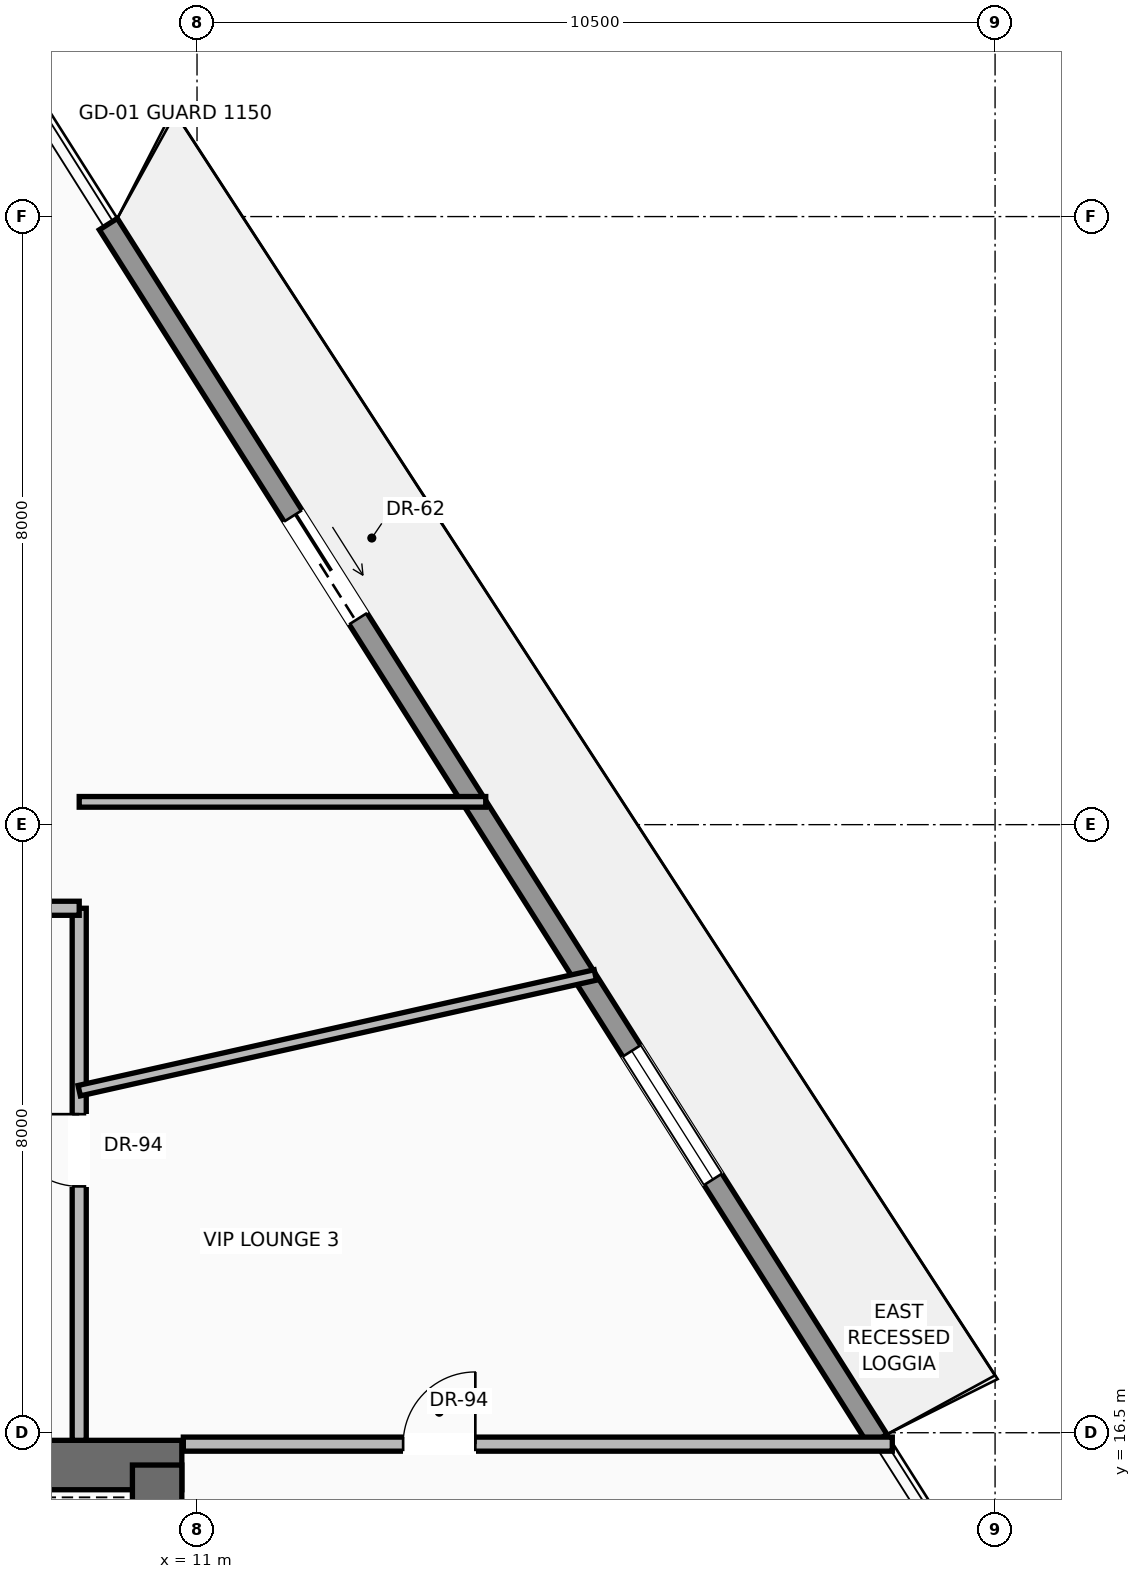
"""IFC4 building model, lengths in metres.
Left out: names, types, materials, properties, quantities, classifications, styles, units other than length and angle.
Written with IfcOpenShell. Run it as: python <this file> out.ifc"""

import sys

from ifc_helpers import new_model, si_unit, direction, frame, frame_2d, origin, place, context, subcontext, project, spatial, rectangle, extrude, source, transform, mapped, element, fill, save


model = new_model("IFC4")
c1 = context("Model", 3, precision=1e-05, world=origin(), true_north=direction((0.0, 1.0)))
c2 = subcontext(c1, "Body", "Model", "MODEL_VIEW")
j1 = project(units=[si_unit("LENGTHUNIT", "METRE"), si_unit("PLANEANGLEUNIT", "RADIAN")], contexts=[c1])
p1 = place(None, origin())
s1 = spatial("IfcSite", under=j1, at=p1, CompositionType="ELEMENT")
p2 = place(p1, origin())
s2 = spatial("IfcBuilding", under=s1, at=p2, CompositionType="ELEMENT")
p3 = place(p2, frame((0.0, 0.0, 189.5)))
s3 = spatial("IfcBuildingStorey", under=s2, at=p3, CompositionType="ELEMENT", Elevation=189.5)
p4 = place(p3, frame((-10.8, 16.075, 0.0), z_axis=(0.0, 0.0, 1.0), x_axis=(1.0, 0.0, 0.0)))
e1 = element("IfcWall", 1, at=p4, inside=s3, PredefinedType="SHEAR", context=c2, shape_type="SweptSolid", body=[
    extrude(rectangle(XDim=21.6, YDim=0.65, at=frame_2d((10.8, 0.0))), origin(), (0.0, 0.0, 1.0), 3.47),
])
p5 = place(p4, frame((3.37, 0.0, 0.0)))
e2 = element("IfcOpeningElement", 2, at=p5, cuts=e1, PredefinedType="OPENING", context=c2, shape_type="SweptSolid", body=[
    extrude(rectangle(XDim=1.3, YDim=2.3, at=frame_2d((0.65, 1.15))), frame((0.0, 0.335, 0.0), z_axis=(0.0, -1.0, 0.0), x_axis=(1.0, 0.0, 0.0)), (0.0, 0.0, 1.0), 0.67),
])
p6 = place(p4, frame((9.8, 0.0, 0.0)))
e3 = element("IfcOpeningElement", 3, at=p6, cuts=e1, PredefinedType="OPENING", context=c2, shape_type="SweptSolid", body=[
    extrude(rectangle(XDim=2.0, YDim=2.4, at=frame_2d((1.0, 1.2))), frame((0.0, 0.335, 0.0), z_axis=(0.0, -1.0, 0.0), x_axis=(1.0, 0.0, 0.0)), (0.0, 0.0, 1.0), 0.67),
])
p7 = place(p3, frame((10.475, 0.525, 0.0), z_axis=(0.0, 0.0, 1.0), x_axis=(0.0, 1.0, 0.0)))
e4 = element("IfcWall", 4, at=p7, inside=s3, PredefinedType="SHEAR", context=c2, shape_type="SweptSolid", body=[
    extrude(rectangle(XDim=15.55, YDim=0.65, at=frame_2d((7.775, 0.0))), origin(), (0.0, 0.0, 1.0), 3.47),
])
p8 = place(p3, frame((9.833, 32.401, 0.0), z_axis=(0.0, 0.0, 1.0), x_axis=(0.534873816305, -0.844931950296, 0.0)))
e5 = element("IfcWall", 5, at=p8, inside=s3, PredefinedType="SOLIDWALL", context=c2, shape_type="SweptSolid", body=[
    extrude(rectangle(XDim=18.932, YDim=0.28, at=frame_2d((9.466, 0.0))), origin(), (0.0, 0.0, 1.0), 3.05),
])
p9 = place(p8, frame((4.544, 0.0, 0.0)))
e6 = element("IfcOpeningElement", 6, at=p9, cuts=e5, PredefinedType="OPENING", context=c2, shape_type="SweptSolid", body=[
    extrude(rectangle(XDim=1.6, YDim=2.35, at=frame_2d((0.8, 1.175))), frame((0.0, 0.15, 0.0), z_axis=(0.0, -1.0, 0.0), x_axis=(1.0, 0.0, 0.0)), (0.0, 0.0, 1.0), 0.3),
])
p10 = place(p8, frame((12.874, 0.0, 0.9)))
e7 = element("IfcOpeningElement", 7, at=p10, cuts=e5, PredefinedType="OPENING", context=c2, shape_type="SweptSolid", body=[
    extrude(rectangle(XDim=2.0, YDim=1.85, at=frame_2d((1.0, 0.925))), frame((0.0, 0.15, 0.0), z_axis=(0.0, -1.0, 0.0), x_axis=(1.0, 0.0, 0.0)), (0.0, 0.0, 1.0), 0.3),
])
p11 = place(p3, frame((9.45, 16.4, 0.0), z_axis=(0.0, 0.0, 1.0), x_axis=(0.0, 1.0, 0.0)))
e8 = element("IfcWall", 8, at=p11, inside=s3, PredefinedType="PARTITIONING", context=c2, shape_type="SweptSolid", body=[
    extrude(rectangle(XDim=7.0, YDim=0.185, at=frame_2d((3.5, 0.0))), origin(), (0.0, 0.0, 1.0), 3.462),
])
p12 = place(p11, frame((3.341, 0.0, 0.0)))
e9 = element("IfcOpeningElement", 9, at=p12, cuts=e8, PredefinedType="OPENING", context=c2, shape_type="SweptSolid", body=[
    extrude(rectangle(XDim=0.95, YDim=2.2, at=frame_2d((0.475, 1.1))), frame((0.0, 0.103, 0.0), z_axis=(0.0, -1.0, 0.0), x_axis=(1.0, 0.0, 0.0)), (0.0, 0.0, 1.0), 0.205),
])
p13 = place(p3, frame((7.25, 23.4, 0.0), z_axis=(0.0, 0.0, 1.0), x_axis=(1.0, 0.0, 0.0)))
e10 = element("IfcWall", 10, at=p13, inside=s3, PredefinedType="PARTITIONING", context=c2, shape_type="SweptSolid", body=[
    extrude(rectangle(XDim=2.2, YDim=0.185, at=frame_2d((1.1, 0.0))), origin(), (0.0, 0.0, 1.0), 3.462),
])
p14 = place(p3, frame((10.82, 16.35, 0.0), z_axis=(0.0, 0.0, 1.0), x_axis=(1.0, 0.0, 0.0)))
e11 = element("IfcWall", 11, at=p14, inside=s3, PredefinedType="PARTITIONING", context=c2, shape_type="SweptSolid", body=[
    extrude(rectangle(XDim=9.328, YDim=0.185, at=frame_2d((4.664, 0.0))), origin(), (0.0, 0.0, 1.0), 3.462),
])
p15 = place(p14, frame((2.892, 0.0, 0.0)))
e12 = element("IfcOpeningElement", 12, at=p15, cuts=e11, PredefinedType="OPENING", context=c2, shape_type="SweptSolid", body=[
    extrude(rectangle(XDim=0.95, YDim=2.2, at=frame_2d((0.475, 1.1))), frame((0.0, 0.103, 0.0), z_axis=(0.0, -1.0, 0.0), x_axis=(1.0, 0.0, 0.0)), (0.0, 0.0, 1.0), 0.205),
])
p16 = place(p3, frame((9.45, 21.0, 0.0), z_axis=(0.0, 0.0, 1.0), x_axis=(0.975775891763, 0.21877250525, 0.0)))
e13 = element("IfcWall", 13, at=p16, inside=s3, PredefinedType="PARTITIONING", context=c2, shape_type="SweptSolid", body=[
    extrude(rectangle(XDim=6.959, YDim=0.14, at=frame_2d((3.479, 0.0))), origin(), (0.0, 0.0, 1.0), 3.049),
])
p17 = place(p3, frame((9.45, 24.8, 0.0), z_axis=(0.0, 0.0, 1.0), x_axis=(1.0, 0.0, 0.0)))
e14 = element("IfcWall", 14, at=p17, inside=s3, PredefinedType="PARTITIONING", context=c2, shape_type="SweptSolid", body=[
    extrude(rectangle(XDim=5.349, YDim=0.14, at=frame_2d((2.674, 0.0))), origin(), (0.0, 0.0, 1.0), 3.462),
])
m1 = source(origin(), c2, "Body", "SweptSolid", [
    extrude(rectangle(XDim=1.6, YDim=2.35, at=frame_2d((0.8, 1.175))), frame((0.0, 0.025, 0.0), z_axis=(0.0, -1.0, 0.0), x_axis=(1.0, 0.0, 0.0)), (0.0, 0.0, 1.0), 0.05),
])
p18 = place(p9, origin())
e15 = element("IfcDoor", 15, at=p18, inside=s3, OperationType="SLIDING_TO_RIGHT", PredefinedType="DOOR", context=c2, shape_type="MappedRepresentation", body=[
    mapped(m1, transform((0.0, 0.0, 0.0), scale=1.0)),
])
fill(e6, e15)
m2 = source(origin(), c2, "Body", "SweptSolid", [
    extrude(rectangle(XDim=2.0, YDim=1.85, at=frame_2d((1.0, 0.925))), frame((0.0, 0.03, 0.0), z_axis=(0.0, -1.0, 0.0), x_axis=(1.0, 0.0, 0.0)), (0.0, 0.0, 1.0), 0.06),
])
p19 = place(p10, origin())
e16 = element("IfcWindow", 16, at=p19, inside=s3, PartitioningType="SINGLE_PANEL", PredefinedType="WINDOW", context=c2, shape_type="MappedRepresentation", body=[
    mapped(m2, transform((0.0, 0.0, 0.0), scale=1.0)),
])
fill(e7, e16)
m3 = source(origin(), c2, "Body", "SweptSolid", [
    extrude(rectangle(XDim=0.95, YDim=2.2, at=frame_2d((0.475, 1.1))), frame((0.0, 0.025, 0.0), z_axis=(0.0, -1.0, 0.0), x_axis=(1.0, 0.0, 0.0)), (0.0, 0.0, 1.0), 0.05),
])
p20 = place(p12, origin())
e17 = element("IfcDoor", 17, at=p20, inside=s3, OperationType="SINGLE_SWING_RIGHT", PredefinedType="DOOR", context=c2, shape_type="MappedRepresentation", body=[
    mapped(m3, transform((0.0, 0.0, 0.0), scale=1.0)),
])
fill(e9, e17)
p21 = place(p15, origin())
e18 = element("IfcDoor", 18, at=p21, inside=s3, OperationType="SINGLE_SWING_RIGHT", PredefinedType="DOOR", context=c2, shape_type="MappedRepresentation", body=[
    mapped(m3, transform((0.0, 0.0, 0.0), scale=1.0)),
])
fill(e12, e18)
save(model, sys.argv[1])
